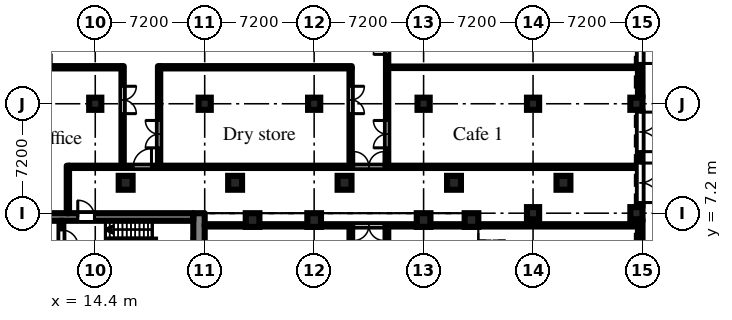
"""IFC4 building model, lengths in metres.
Left out: names, types, materials, properties, quantities, classifications, styles, units other than length and angle.
Written with IfcOpenShell. Run it as: python <this file> out.ifc"""

import sys

from ifc_helpers import new_model, si_unit, direction, frame, frame_2d, origin, origin_2d, place, context, subcontext, project, spatial, rectangle, hollow_circle, extrude, element, fill, save


model = new_model("IFC4")
c1 = context("Model", 3, precision=1e-05, world=origin(), true_north=direction((0.0, 1.0)))
c2 = subcontext(c1, "Body", "Model", "MODEL_VIEW")
j1 = project(units=[si_unit("LENGTHUNIT", "METRE"), si_unit("PLANEANGLEUNIT", "RADIAN")], contexts=[c1])
p1 = place(None, origin())
s1 = spatial("IfcSite", under=j1, at=p1, CompositionType="ELEMENT")
p2 = place(p1, origin())
s2 = spatial("IfcBuilding", under=s1, at=p2, CompositionType="ELEMENT")
p3 = place(p2, origin())
s3 = spatial("IfcBuildingStorey", under=s2, at=p3, CompositionType="ELEMENT", Elevation=0.0)
for number, where, z_axis, x_axis in (
    (1, (24.75, 6.75, 0.0), (0.0, 0.0, 1.0), (1.0, 0.0, 0.0)),
    (2, (28.8, 6.75, 0.0), (0.0, 0.0, 1.0), (1.0, 0.0, 0.0)),
    (3, (36.0, 6.75, 0.0), (0.0, 0.0, 1.0), (1.0, 0.0, 0.0)),
    (4, (39.15, 6.75, 0.0), (0.0, 0.0, 1.0), (1.0, 0.0, 0.0)),
):
    element("IfcColumn", number, at=place(p3, frame(where, z_axis=z_axis, x_axis=x_axis)), inside=s3, PredefinedType="COLUMN", context=c2, shape_type="SweptSolid", body=[
        extrude(rectangle(XDim=0.9, YDim=0.9, at=origin_2d()), origin(), (0.0, 0.0, 1.0), 7.2),
    ])
for number, where, z_axis, x_axis in (
    (5, (14.4, 14.4, 0.0), (0.0, 0.0, 1.0), (1.0, 0.0, 0.0)),
    (6, (21.6, 14.4, 0.0), (0.0, 0.0, 1.0), (1.0, 0.0, 0.0)),
    (7, (28.8, 14.4, 0.0), (0.0, 0.0, 1.0), (1.0, 0.0, 0.0)),
    (8, (36.0, 14.4, 0.0), (0.0, 0.0, 1.0), (1.0, 0.0, 0.0)),
    (9, (43.2, 7.2, 0.0), (0.0, 0.0, 1.0), (1.0, 0.0, 0.0)),
    (10, (43.2, 14.4, 0.0), (0.0, 0.0, 1.0), (1.0, 0.0, 0.0)),
    (11, (50.0, 7.2, 0.0), (0.0, 0.0, 1.0), (1.0, 0.0, 0.0)),
    (12, (50.0, 14.4, 0.0), (0.0, 0.0, 1.0), (1.0, 0.0, 0.0)),
):
    element("IfcColumn", number, at=place(p3, frame(where, z_axis=z_axis, x_axis=x_axis)), inside=s3, PredefinedType="COLUMN", context=c2, shape_type="SweptSolid", body=[
        extrude(rectangle(XDim=0.8, YDim=0.8, at=origin_2d()), origin(), (0.0, 0.0, 1.0), 6.6),
    ])
for number, where, z_axis, x_axis in (
    (13, (45.2, 9.2, 0.0), (0.0, 0.0, 1.0), (1.0, 0.0, 0.0)),
    (14, (38.0, 9.2, 0.0), (0.0, 0.0, 1.0), (1.0, 0.0, 0.0)),
    (15, (30.8, 9.2, 0.0), (0.0, 0.0, 1.0), (1.0, 0.0, 0.0)),
    (16, (23.6, 9.2, 0.0), (0.0, 0.0, 1.0), (1.0, 0.0, 0.0)),
    (17, (16.4, 9.2, 0.0), (0.0, 0.0, 1.0), (1.0, 0.0, 0.0)),
):
    element("IfcColumn", number, at=place(p3, frame(where, z_axis=z_axis, x_axis=x_axis)), inside=s3, PredefinedType="COLUMN", context=c2, shape_type="SweptSolid", body=[
        extrude(hollow_circle(Radius=0.457, WallThickness=0.05, at=origin_2d()), origin(), (0.0, 0.0, 1.0), 7.5),
    ])
p4 = place(p3, frame((50.25, 0.4, 0.0), z_axis=(0.0, 0.0, 1.0), x_axis=(0.0, 1.0, 0.0)))
e18 = element("IfcWall", 18, at=p4, inside=s3, PredefinedType="SOLIDWALL", context=c2, shape_type="SweptSolid", body=[
    extrude(rectangle(XDim=6.4, YDim=0.3, at=frame_2d((3.2, 0.0))), origin(), (0.0, 0.0, 1.0), 6.6),
])
p5 = place(p4, frame((0.45, 0.0, 0.0)))
e19 = element("IfcOpeningElement", 19, at=p5, cuts=e18, PredefinedType="OPENING", context=c2, shape_type="SweptSolid", body=[
    extrude(rectangle(XDim=2.6, YDim=2.4, at=frame_2d((1.3, 1.2))), frame((0.0, 0.16, 0.0), z_axis=(0.0, -1.0, 0.0), x_axis=(1.0, 0.0, 0.0)), (0.0, 0.0, 1.0), 0.32),
])
p6 = place(p3, frame((50.25, 7.6, 0.0), z_axis=(0.0, 0.0, 1.0), x_axis=(0.0, 1.0, 0.0)))
e20 = element("IfcWall", 20, at=p6, inside=s3, PredefinedType="SOLIDWALL", context=c2, shape_type="SweptSolid", body=[
    extrude(rectangle(XDim=6.4, YDim=0.3, at=frame_2d((3.2, 0.0))), origin(), (0.0, 0.0, 1.0), 6.6),
])
p7 = place(p6, frame((0.3, 0.0, 0.0)))
e21 = element("IfcOpeningElement", 21, at=p7, cuts=e20, PredefinedType="OPENING", context=c2, shape_type="SweptSolid", body=[
    extrude(rectangle(XDim=2.6, YDim=2.4, at=frame_2d((1.3, 1.2))), frame((0.0, 0.16, 0.0), z_axis=(0.0, -1.0, 0.0), x_axis=(1.0, 0.0, 0.0)), (0.0, 0.0, 1.0), 0.32),
])
p8 = place(p6, frame((3.65, 0.0, 0.0)))
e22 = element("IfcOpeningElement", 22, at=p8, cuts=e20, PredefinedType="OPENING", context=c2, shape_type="SweptSolid", body=[
    extrude(rectangle(XDim=2.6, YDim=2.4, at=frame_2d((1.3, 1.2))), frame((0.0, 0.16, 0.0), z_axis=(0.0, -1.0, 0.0), x_axis=(1.0, 0.0, 0.0)), (0.0, 0.0, 1.0), 0.32),
])
p9 = place(p3, frame((50.25, 14.8, 0.0), z_axis=(0.0, 0.0, 1.0), x_axis=(0.0, 1.0, 0.0)))
e23 = element("IfcWall", 23, at=p9, inside=s3, PredefinedType="SOLIDWALL", context=c2, shape_type="SweptSolid", body=[
    extrude(rectangle(XDim=6.4, YDim=0.3, at=frame_2d((3.2, 0.0))), origin(), (0.0, 0.0, 1.0), 6.6),
])
p10 = place(p9, frame((2.25, 0.0, 0.0)))
e24 = element("IfcOpeningElement", 24, at=p10, cuts=e23, PredefinedType="OPENING", context=c2, shape_type="SweptSolid", body=[
    extrude(rectangle(XDim=2.6, YDim=2.4, at=frame_2d((1.3, 1.2))), frame((0.0, 0.16, 0.0), z_axis=(0.0, -1.0, 0.0), x_axis=(1.0, 0.0, 0.0)), (0.0, 0.0, 1.0), 0.32),
])
p11 = place(p3, frame((21.225, -7.2, 0.0), z_axis=(0.0, 0.0, 1.0), x_axis=(0.0, 1.0, 0.0)))
e25 = element("IfcWall", 25, at=p11, inside=s3, PredefinedType="SHEAR", context=c2, shape_type="SweptSolid", body=[
    extrude(rectangle(XDim=14.4, YDim=0.75, at=frame_2d((7.2, 0.0))), origin(), (0.0, 0.0, 1.0), 6.6),
])
p12 = place(p11, frame((6.0, 0.0, 0.0)))
e26 = element("IfcOpeningElement", 26, at=p12, cuts=e25, PredefinedType="OPENING", context=c2, shape_type="SweptSolid", body=[
    extrude(rectangle(XDim=2.4, YDim=2.2, at=frame_2d((1.2, 1.1))), frame((0.0, 0.385, 0.0), z_axis=(0.0, -1.0, 0.0), x_axis=(1.0, 0.0, 0.0)), (0.0, 0.0, 1.0), 0.77),
])
p13 = place(p3, frame((7.9, 6.95, 0.0), z_axis=(0.0, 0.0, 1.0), x_axis=(1.0, 0.0, 0.0)))
e27 = element("IfcWall", 27, at=p13, inside=s3, PredefinedType="SHEAR", context=c2, shape_type="SweptSolid", body=[
    extrude(rectangle(XDim=12.95, YDim=0.5, at=frame_2d((6.475, 0.0))), origin(), (0.0, 0.0, 1.0), 6.6),
])
p14 = place(p13, frame((5.35, 0.0, 0.0)))
e28 = element("IfcOpeningElement", 28, at=p14, cuts=e27, PredefinedType="OPENING", context=c2, shape_type="SweptSolid", body=[
    extrude(rectangle(XDim=1.1, YDim=2.1, at=frame_2d((0.55, 1.05))), frame((0.0, 0.26, 0.0), z_axis=(0.0, -1.0, 0.0), x_axis=(1.0, 0.0, 0.0)), (0.0, 0.0, 1.0), 0.52),
])
p15 = place(p3, frame((12.175, 2.05, 0.0), z_axis=(0.0, 0.0, 1.0), x_axis=(0.0, 1.0, 0.0)))
e29 = element("IfcWall", 29, at=p15, inside=s3, PredefinedType="SHEAR", context=c2, shape_type="SweptSolid", body=[
    extrude(rectangle(XDim=4.65, YDim=0.25, at=frame_2d((2.325, 0.0))), origin(), (0.0, 0.0, 1.0), 6.6),
])
p16 = place(p15, frame((2.95, 0.0, 0.0)))
e30 = element("IfcOpeningElement", 30, at=p16, cuts=e29, PredefinedType="OPENING", context=c2, shape_type="SweptSolid", body=[
    extrude(rectangle(XDim=1.1, YDim=2.1, at=frame_2d((0.55, 1.05))), frame((0.0, 0.135, 0.0), z_axis=(0.0, -1.0, 0.0), x_axis=(1.0, 0.0, 0.0)), (0.0, 0.0, 1.0), 0.27),
])
p17 = place(p3, frame((9.521, 16.8, 0.0), z_axis=(0.0, 0.0, 1.0), x_axis=(1.0, 0.0, 0.0)))
e31 = element("IfcWall", 31, at=p17, inside=s3, PredefinedType="PARTITIONING", context=c2, shape_type="SweptSolid", body=[
    extrude(rectangle(XDim=6.604, YDim=0.15, at=frame_2d((3.302, 0.0))), origin(), (0.0, 0.0, 1.0), 6.6),
])
p18 = place(p17, frame((0.178, 0.0, 0.0)))
e32 = element("IfcOpeningElement", 32, at=p18, cuts=e31, PredefinedType="OPENING", context=c2, shape_type="SweptSolid", body=[
    extrude(rectangle(XDim=1.8, YDim=2.1, at=frame_2d((0.9, 1.05))), frame((0.0, 0.085, 0.0), z_axis=(0.0, -1.0, 0.0), x_axis=(1.0, 0.0, 0.0)), (0.0, 0.0, 1.0), 0.17),
])
p19 = place(p3, frame((12.6, 7.2, 0.0), z_axis=(0.0, 0.0, 1.0), x_axis=(0.0, 1.0, 0.0)))
e33 = element("IfcWall", 33, at=p19, inside=s3, PredefinedType="PARTITIONING", context=c2, shape_type="SweptSolid", body=[
    extrude(rectangle(XDim=3.125, YDim=0.15, at=frame_2d((1.562, 0.0))), origin(), (0.0, 0.0, 1.0), 6.6),
])
p20 = place(p3, frame((12.675, 10.25, 0.0), z_axis=(0.0, 0.0, 1.0), x_axis=(1.0, 0.0, 0.0)))
e34 = element("IfcWall", 34, at=p20, inside=s3, PredefinedType="PARTITIONING", context=c2, shape_type="SweptSolid", body=[
    extrude(rectangle(XDim=37.545, YDim=0.15, at=frame_2d((18.772, 0.0))), origin(), (0.0, 0.0, 1.0), 6.6),
])
p21 = place(p20, frame((4.225, 0.0, 0.0)))
e35 = element("IfcOpeningElement", 35, at=p21, cuts=e34, PredefinedType="OPENING", context=c2, shape_type="SweptSolid", body=[
    extrude(rectangle(XDim=1.2, YDim=2.1, at=frame_2d((0.6, 1.05))), frame((0.0, 0.085, 0.0), z_axis=(0.0, -1.0, 0.0), x_axis=(1.0, 0.0, 0.0)), (0.0, 0.0, 1.0), 0.17),
])
p22 = place(p20, frame((18.725, 0.0, 0.0)))
e36 = element("IfcOpeningElement", 36, at=p22, cuts=e34, PredefinedType="OPENING", context=c2, shape_type="SweptSolid", body=[
    extrude(rectangle(XDim=2.0, YDim=2.1, at=frame_2d((1.0, 1.05))), frame((0.0, 0.085, 0.0), z_axis=(0.0, -1.0, 0.0), x_axis=(1.0, 0.0, 0.0)), (0.0, 0.0, 1.0), 0.17),
])
p23 = place(p3, frame((16.2, 10.325, 0.0), z_axis=(0.0, 0.0, 1.0), x_axis=(0.0, 1.0, 0.0)))
e37 = element("IfcWall", 37, at=p23, inside=s3, PredefinedType="PARTITIONING", context=c2, shape_type="SweptSolid", body=[
    extrude(rectangle(XDim=6.55, YDim=0.15, at=frame_2d((3.275, 0.0))), origin(), (0.0, 0.0, 1.0), 6.6),
])
p24 = place(p23, frame((3.425, 0.0, 0.0)))
e38 = element("IfcOpeningElement", 38, at=p24, cuts=e37, PredefinedType="OPENING", context=c2, shape_type="SweptSolid", body=[
    extrude(rectangle(XDim=1.8, YDim=2.1, at=frame_2d((0.9, 1.05))), frame((0.0, 0.085, 0.0), z_axis=(0.0, -1.0, 0.0), x_axis=(1.0, 0.0, 0.0)), (0.0, 0.0, 1.0), 0.17),
])
p25 = place(p3, frame((18.6, 10.325, 0.0), z_axis=(0.0, 0.0, 1.0), x_axis=(0.0, 1.0, 0.0)))
e39 = element("IfcWall", 39, at=p25, inside=s3, PredefinedType="PARTITIONING", context=c2, shape_type="SweptSolid", body=[
    extrude(rectangle(XDim=6.55, YDim=0.15, at=frame_2d((3.275, 0.0))), origin(), (0.0, 0.0, 1.0), 6.6),
])
p26 = place(p25, frame((1.175, 0.0, 0.0)))
e40 = element("IfcOpeningElement", 40, at=p26, cuts=e39, PredefinedType="OPENING", context=c2, shape_type="SweptSolid", body=[
    extrude(rectangle(XDim=1.8, YDim=2.1, at=frame_2d((0.9, 1.05))), frame((0.0, 0.085, 0.0), z_axis=(0.0, -1.0, 0.0), x_axis=(1.0, 0.0, 0.0)), (0.0, 0.0, 1.0), 0.17),
])
p27 = place(p3, frame((18.675, 16.8, 0.0), z_axis=(0.0, 0.0, 1.0), x_axis=(1.0, 0.0, 0.0)))
e41 = element("IfcWall", 41, at=p27, inside=s3, PredefinedType="PARTITIONING", context=c2, shape_type="SweptSolid", body=[
    extrude(rectangle(XDim=12.6, YDim=0.15, at=frame_2d((6.3, 0.0))), origin(), (0.0, 0.0, 1.0), 6.6),
])
p28 = place(p3, frame((21.6, 6.4, 0.0), z_axis=(0.0, 0.0, 1.0), x_axis=(1.0, 0.0, 0.0)))
e42 = element("IfcWall", 42, at=p28, inside=s3, PredefinedType="PARTITIONING", context=c2, shape_type="SweptSolid", body=[
    extrude(rectangle(XDim=28.62, YDim=0.15, at=frame_2d((14.31, 0.0))), origin(), (0.0, 0.0, 1.0), 6.6),
])
p29 = place(p28, frame((9.8, 0.0, 0.0)))
e43 = element("IfcOpeningElement", 43, at=p29, cuts=e42, PredefinedType="OPENING", context=c2, shape_type="SweptSolid", body=[
    extrude(rectangle(XDim=2.0, YDim=2.1, at=frame_2d((1.0, 1.05))), frame((0.0, 0.085, 0.0), z_axis=(0.0, -1.0, 0.0), x_axis=(1.0, 0.0, 0.0)), (0.0, 0.0, 1.0), 0.17),
])
p30 = place(p3, frame((31.2, -6.325, 0.0), z_axis=(0.0, 0.0, 1.0), x_axis=(0.0, 1.0, 0.0)))
e44 = element("IfcWall", 44, at=p30, inside=s3, PredefinedType="PARTITIONING", context=c2, shape_type="SweptSolid", body=[
    extrude(rectangle(XDim=12.65, YDim=0.15, at=frame_2d((6.325, 0.0))), origin(), (0.0, 0.0, 1.0), 6.6),
])
p31 = place(p30, frame((5.325, 0.0, 0.0)))
e45 = element("IfcOpeningElement", 45, at=p31, cuts=e44, PredefinedType="OPENING", context=c2, shape_type="SweptSolid", body=[
    extrude(rectangle(XDim=2.0, YDim=2.1, at=frame_2d((1.0, 1.05))), frame((0.0, 0.085, 0.0), z_axis=(0.0, -1.0, 0.0), x_axis=(1.0, 0.0, 0.0)), (0.0, 0.0, 1.0), 0.17),
])
p32 = place(p30, frame((8.175, 0.0, 0.0)))
e46 = element("IfcOpeningElement", 46, at=p32, cuts=e44, PredefinedType="OPENING", context=c2, shape_type="SweptSolid", body=[
    extrude(rectangle(XDim=0.9, YDim=2.1, at=frame_2d((0.45, 1.05))), frame((0.0, 0.085, 0.0), z_axis=(0.0, -1.0, 0.0), x_axis=(1.0, 0.0, 0.0)), (0.0, 0.0, 1.0), 0.17),
])
p33 = place(p30, frame((2.675, 0.0, 0.0)))
e47 = element("IfcOpeningElement", 47, at=p33, cuts=e44, PredefinedType="OPENING", context=c2, shape_type="SweptSolid", body=[
    extrude(rectangle(XDim=1.8, YDim=2.1, at=frame_2d((0.9, 1.05))), frame((0.0, 0.085, 0.0), z_axis=(0.0, -1.0, 0.0), x_axis=(1.0, 0.0, 0.0)), (0.0, 0.0, 1.0), 0.17),
])
p34 = place(p3, frame((31.2, 10.325, 0.0), z_axis=(0.0, 0.0, 1.0), x_axis=(0.0, 1.0, 0.0)))
e48 = element("IfcWall", 48, at=p34, inside=s3, PredefinedType="PARTITIONING", context=c2, shape_type="SweptSolid", body=[
    extrude(rectangle(XDim=6.4, YDim=0.15, at=frame_2d((3.2, 0.0))), origin(), (0.0, 0.0, 1.0), 6.6),
])
p35 = place(p34, frame((3.425, 0.0, 0.0)))
e49 = element("IfcOpeningElement", 49, at=p35, cuts=e48, PredefinedType="OPENING", context=c2, shape_type="SweptSolid", body=[
    extrude(rectangle(XDim=1.8, YDim=2.1, at=frame_2d((0.9, 1.05))), frame((0.0, 0.085, 0.0), z_axis=(0.0, -1.0, 0.0), x_axis=(1.0, 0.0, 0.0)), (0.0, 0.0, 1.0), 0.17),
])
p36 = place(p3, frame((33.6, 1.5, 0.0), z_axis=(0.0, 0.0, 1.0), x_axis=(0.0, 1.0, 0.0)))
e50 = element("IfcWall", 50, at=p36, inside=s3, PredefinedType="PARTITIONING", context=c2, shape_type="SweptSolid", body=[
    extrude(rectangle(XDim=4.825, YDim=0.15, at=frame_2d((2.413, 0.0))), origin(), (0.0, 0.0, 1.0), 6.6),
])
p37 = place(p36, frame((0.65, 0.0, 0.0)))
e51 = element("IfcOpeningElement", 51, at=p37, cuts=e50, PredefinedType="OPENING", context=c2, shape_type="SweptSolid", body=[
    extrude(rectangle(XDim=1.8, YDim=2.1, at=frame_2d((0.9, 1.05))), frame((0.0, 0.085, 0.0), z_axis=(0.0, -1.0, 0.0), x_axis=(1.0, 0.0, 0.0)), (0.0, 0.0, 1.0), 0.17),
])
p38 = place(p3, frame((33.6, 10.325, 0.0), z_axis=(0.0, 0.0, 1.0), x_axis=(0.0, 1.0, 0.0)))
e52 = element("IfcWall", 52, at=p38, inside=s3, PredefinedType="PARTITIONING", context=c2, shape_type="SweptSolid", body=[
    extrude(rectangle(XDim=20.95, YDim=0.15, at=frame_2d((10.475, 0.0))), origin(), (0.0, 0.0, 1.0), 6.6),
])
p39 = place(p38, frame((1.175, 0.0, 0.0)))
e53 = element("IfcOpeningElement", 53, at=p39, cuts=e52, PredefinedType="OPENING", context=c2, shape_type="SweptSolid", body=[
    extrude(rectangle(XDim=1.8, YDim=2.1, at=frame_2d((0.9, 1.05))), frame((0.0, 0.085, 0.0), z_axis=(0.0, -1.0, 0.0), x_axis=(1.0, 0.0, 0.0)), (0.0, 0.0, 1.0), 0.17),
])
p40 = place(p38, frame((7.325, 0.0, 0.0)))
e54 = element("IfcOpeningElement", 54, at=p40, cuts=e52, PredefinedType="OPENING", context=c2, shape_type="SweptSolid", body=[
    extrude(rectangle(XDim=1.8, YDim=2.1, at=frame_2d((0.9, 1.05))), frame((0.0, 0.085, 0.0), z_axis=(0.0, -1.0, 0.0), x_axis=(1.0, 0.0, 0.0)), (0.0, 0.0, 1.0), 0.17),
])
p41 = place(p38, frame((18.425, 0.0, 0.0)))
e55 = element("IfcOpeningElement", 55, at=p41, cuts=e52, PredefinedType="OPENING", context=c2, shape_type="SweptSolid", body=[
    extrude(rectangle(XDim=1.8, YDim=2.1, at=frame_2d((0.9, 1.05))), frame((0.0, 0.085, 0.0), z_axis=(0.0, -1.0, 0.0), x_axis=(1.0, 0.0, 0.0)), (0.0, 0.0, 1.0), 0.17),
])
p42 = place(p3, frame((33.675, 16.8, 0.0), z_axis=(0.0, 0.0, 1.0), x_axis=(1.0, 0.0, 0.0)))
e56 = element("IfcWall", 56, at=p42, inside=s3, PredefinedType="PARTITIONING", context=c2, shape_type="SweptSolid", body=[
    extrude(rectangle(XDim=16.545, YDim=0.1, at=frame_2d((8.272, 0.0))), origin(), (0.0, 0.0, 1.0), 6.6),
])
p43 = place(p7, frame((2.6, 0.0, 0.0), z_axis=(0.0, 0.0, 1.0), x_axis=(-1.0, 0.0, 0.0)))
e57 = element("IfcDoor", 57, at=p43, inside=s3, OperationType="DOUBLE_DOOR_DOUBLE_SWING", PredefinedType="DOOR", context=c2, shape_type="SweptSolid", body=[
    extrude(rectangle(XDim=2.6, YDim=2.4, at=frame_2d((1.3, 1.2))), frame((0.0, 0.025, 0.0), z_axis=(0.0, -1.0, 0.0), x_axis=(1.0, 0.0, 0.0)), (0.0, 0.0, 1.0), 0.05),
])
fill(e21, e57)
p44 = place(p8, frame((2.6, 0.0, 0.0), z_axis=(0.0, 0.0, 1.0), x_axis=(-1.0, 0.0, 0.0)))
e58 = element("IfcDoor", 58, at=p44, inside=s3, OperationType="DOUBLE_DOOR_DOUBLE_SWING", PredefinedType="DOOR", context=c2, shape_type="SweptSolid", body=[
    extrude(rectangle(XDim=2.6, YDim=2.4, at=frame_2d((1.3, 1.2))), frame((0.0, 0.025, 0.0), z_axis=(0.0, -1.0, 0.0), x_axis=(1.0, 0.0, 0.0)), (0.0, 0.0, 1.0), 0.05),
])
fill(e22, e58)
p45 = place(p10, frame((2.6, 0.0, 0.0), z_axis=(0.0, 0.0, 1.0), x_axis=(-1.0, 0.0, 0.0)))
e59 = element("IfcDoor", 59, at=p45, inside=s3, OperationType="DOUBLE_DOOR_DOUBLE_SWING", PredefinedType="DOOR", context=c2, shape_type="SweptSolid", body=[
    extrude(rectangle(XDim=2.6, YDim=2.4, at=frame_2d((1.3, 1.2))), frame((0.0, 0.025, 0.0), z_axis=(0.0, -1.0, 0.0), x_axis=(1.0, 0.0, 0.0)), (0.0, 0.0, 1.0), 0.05),
])
fill(e24, e59)
p46 = place(p16, frame((1.1, 0.0, 0.0), z_axis=(0.0, 0.0, 1.0), x_axis=(-1.0, 0.0, 0.0)))
e60 = element("IfcDoor", 60, at=p46, inside=s3, OperationType="SINGLE_SWING_RIGHT", PredefinedType="DOOR", context=c2, shape_type="SweptSolid", body=[
    extrude(rectangle(XDim=1.1, YDim=2.1, at=frame_2d((0.55, 1.05))), frame((0.0, 0.025, 0.0), z_axis=(0.0, -1.0, 0.0), x_axis=(1.0, 0.0, 0.0)), (0.0, 0.0, 1.0), 0.05),
])
fill(e30, e60)
p47 = place(p14, origin())
e61 = element("IfcDoor", 61, at=p47, inside=s3, OperationType="SINGLE_SWING_LEFT", PredefinedType="DOOR", context=c2, shape_type="SweptSolid", body=[
    extrude(rectangle(XDim=1.1, YDim=2.1, at=frame_2d((0.55, 1.05))), frame((0.0, 0.025, 0.0), z_axis=(0.0, -1.0, 0.0), x_axis=(1.0, 0.0, 0.0)), (0.0, 0.0, 1.0), 0.05),
])
fill(e28, e61)
p48 = place(p21, origin())
e62 = element("IfcDoor", 62, at=p48, inside=s3, OperationType="SINGLE_SWING_RIGHT", PredefinedType="DOOR", context=c2, shape_type="SweptSolid", body=[
    extrude(rectangle(XDim=1.2, YDim=2.1, at=frame_2d((0.6, 1.05))), frame((0.0, 0.025, 0.0), z_axis=(0.0, -1.0, 0.0), x_axis=(1.0, 0.0, 0.0)), (0.0, 0.0, 1.0), 0.05),
])
fill(e35, e62)
p49 = place(p29, frame((2.0, 0.0, 0.0), z_axis=(0.0, 0.0, 1.0), x_axis=(-1.0, 0.0, 0.0)))
e63 = element("IfcDoor", 63, at=p49, inside=s3, OperationType="DOUBLE_DOOR_DOUBLE_SWING", PredefinedType="DOOR", context=c2, shape_type="SweptSolid", body=[
    extrude(rectangle(XDim=2.0, YDim=2.1, at=frame_2d((1.0, 1.05))), frame((0.0, 0.025, 0.0), z_axis=(0.0, -1.0, 0.0), x_axis=(1.0, 0.0, 0.0)), (0.0, 0.0, 1.0), 0.05),
])
fill(e43, e63)
p50 = place(p22, origin())
e64 = element("IfcDoor", 64, at=p50, inside=s3, OperationType="DOUBLE_DOOR_DOUBLE_SWING", PredefinedType="DOOR", context=c2, shape_type="SweptSolid", body=[
    extrude(rectangle(XDim=2.0, YDim=2.1, at=frame_2d((1.0, 1.05))), frame((0.0, 0.025, 0.0), z_axis=(0.0, -1.0, 0.0), x_axis=(1.0, 0.0, 0.0)), (0.0, 0.0, 1.0), 0.05),
])
fill(e36, e64)
p51 = place(p24, frame((1.8, 0.0, 0.0), z_axis=(0.0, 0.0, 1.0), x_axis=(-1.0, 0.0, 0.0)))
e65 = element("IfcDoor", 65, at=p51, inside=s3, OperationType="DOUBLE_DOOR_DOUBLE_SWING", PredefinedType="DOOR", context=c2, shape_type="SweptSolid", body=[
    extrude(rectangle(XDim=1.8, YDim=2.1, at=frame_2d((0.9, 1.05))), frame((0.0, 0.025, 0.0), z_axis=(0.0, -1.0, 0.0), x_axis=(1.0, 0.0, 0.0)), (0.0, 0.0, 1.0), 0.05),
])
fill(e38, e65)
p52 = place(p26, origin())
e66 = element("IfcDoor", 66, at=p52, inside=s3, OperationType="DOUBLE_DOOR_DOUBLE_SWING", PredefinedType="DOOR", context=c2, shape_type="SweptSolid", body=[
    extrude(rectangle(XDim=1.8, YDim=2.1, at=frame_2d((0.9, 1.05))), frame((0.0, 0.025, 0.0), z_axis=(0.0, -1.0, 0.0), x_axis=(1.0, 0.0, 0.0)), (0.0, 0.0, 1.0), 0.05),
])
fill(e40, e66)
p53 = place(p35, frame((1.8, 0.0, 0.0), z_axis=(0.0, 0.0, 1.0), x_axis=(-1.0, 0.0, 0.0)))
e67 = element("IfcDoor", 67, at=p53, inside=s3, OperationType="DOUBLE_DOOR_DOUBLE_SWING", PredefinedType="DOOR", context=c2, shape_type="SweptSolid", body=[
    extrude(rectangle(XDim=1.8, YDim=2.1, at=frame_2d((0.9, 1.05))), frame((0.0, 0.025, 0.0), z_axis=(0.0, -1.0, 0.0), x_axis=(1.0, 0.0, 0.0)), (0.0, 0.0, 1.0), 0.05),
])
fill(e49, e67)
p54 = place(p39, origin())
e68 = element("IfcDoor", 68, at=p54, inside=s3, OperationType="DOUBLE_DOOR_DOUBLE_SWING", PredefinedType="DOOR", context=c2, shape_type="SweptSolid", body=[
    extrude(rectangle(XDim=1.8, YDim=2.1, at=frame_2d((0.9, 1.05))), frame((0.0, 0.025, 0.0), z_axis=(0.0, -1.0, 0.0), x_axis=(1.0, 0.0, 0.0)), (0.0, 0.0, 1.0), 0.05),
])
fill(e53, e68)
p55 = place(p40, origin())
e69 = element("IfcDoor", 69, at=p55, inside=s3, OperationType="DOUBLE_DOOR_DOUBLE_SWING", PredefinedType="DOOR", context=c2, shape_type="SweptSolid", body=[
    extrude(rectangle(XDim=1.8, YDim=2.1, at=frame_2d((0.9, 1.05))), frame((0.0, 0.025, 0.0), z_axis=(0.0, -1.0, 0.0), x_axis=(1.0, 0.0, 0.0)), (0.0, 0.0, 1.0), 0.05),
])
fill(e54, e69)
save(model, sys.argv[1])
